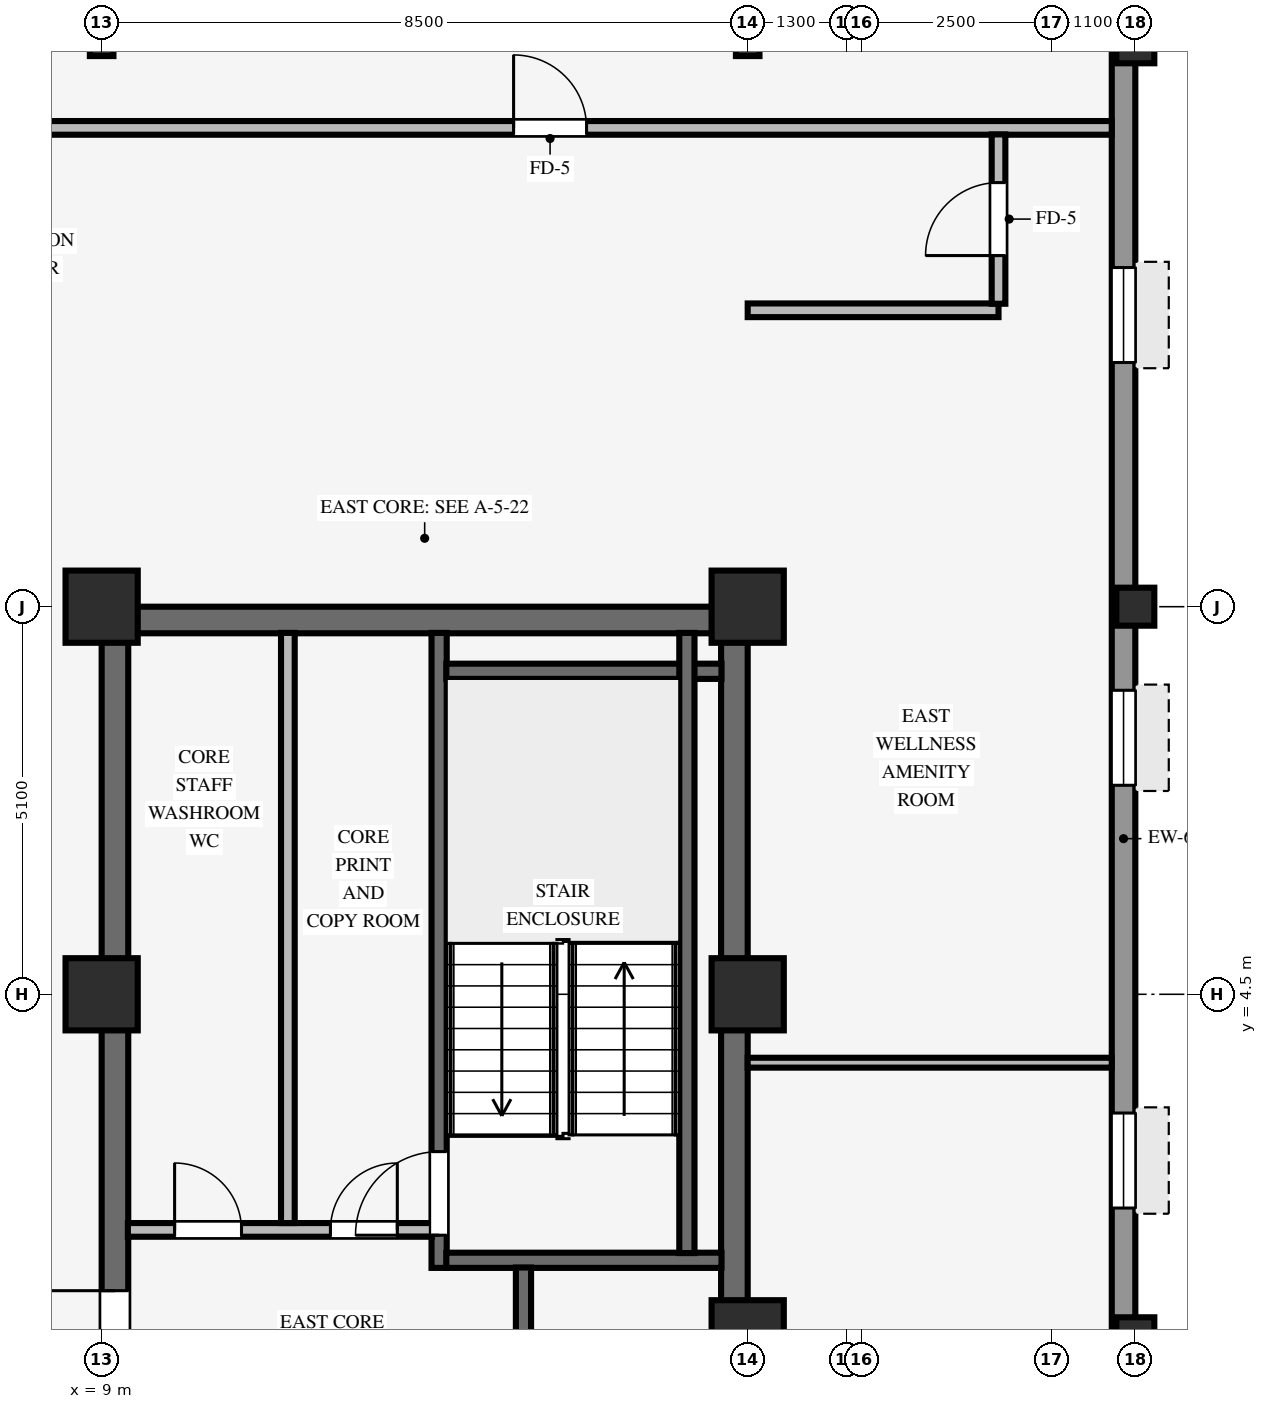
"""IFC4 building model, lengths in metres.
Left out: names, types, materials, properties, quantities, classifications, styles, units other than length and angle.
Written with IfcOpenShell. Run it as: python <this file> out.ifc"""

import sys

from ifc_helpers import new_model, si_unit, direction, frame, frame_2d, origin, origin_2d, place, context, subcontext, project, spatial, rectangle, hollow_rectangle, i_section, extrude, source, transform, mapped, element, fill, save


model = new_model("IFC4")
c1 = context("Model", 3, precision=1e-05, world=origin(), true_north=direction((0.0, 1.0)))
c2 = subcontext(c1, "Body", "Model", "MODEL_VIEW")
j1 = project(units=[si_unit("LENGTHUNIT", "METRE"), si_unit("PLANEANGLEUNIT", "RADIAN")], contexts=[c1])
p1 = place(None, origin())
s1 = spatial("IfcSite", under=j1, at=p1, CompositionType="ELEMENT")
p2 = place(p1, origin())
s2 = spatial("IfcBuilding", under=s1, at=p2, CompositionType="ELEMENT")
p3 = place(p2, frame((0.0, 0.0, 194.55)))
s3 = spatial("IfcBuildingStorey", under=s2, at=p3, CompositionType="ELEMENT", Elevation=194.55)
p4 = place(p3, frame((9.0, 9.425, 0.0), z_axis=(0.0, 0.0, 1.0), x_axis=(1.0, 0.0, 0.0)))
e1 = element("IfcWall", 1, at=p4, inside=s3, PredefinedType="SHEAR", context=c2, shape_type="SweptSolid", body=[
    extrude(rectangle(XDim=8.5, YDim=0.35, at=frame_2d((4.25, 0.0))), origin(), (0.0, 0.0, 1.0), 3.37),
])
p5 = place(p3, frame((9.175, -9.255, 0.0), z_axis=(0.0, 0.0, 1.0), x_axis=(0.0, 1.0, 0.0)))
e2 = element("IfcWall", 2, at=p5, inside=s3, PredefinedType="SHEAR", context=c2, shape_type="SweptSolid", body=[
    extrude(rectangle(XDim=18.51, YDim=0.35, at=frame_2d((9.255, 0.0))), origin(), (0.0, 0.0, 1.0), 3.37),
])
p6 = place(p5, frame((8.655, 0.0, 0.0)))
e3 = element("IfcOpeningElement", 3, at=p6, cuts=e2, PredefinedType="OPENING", context=c2, shape_type="SweptSolid", body=[
    extrude(rectangle(XDim=1.2, YDim=2.15, at=frame_2d((0.6, 1.075))), frame((0.0, 0.185, 0.0), z_axis=(0.0, -1.0, 0.0), x_axis=(1.0, 0.0, 0.0)), (0.0, 0.0, 1.0), 0.37),
])
p7 = place(p3, frame((17.325, -9.255, 0.0), z_axis=(0.0, 0.0, 1.0), x_axis=(0.0, 1.0, 0.0)))
e4 = element("IfcWall", 4, at=p7, inside=s3, PredefinedType="SHEAR", context=c2, shape_type="SweptSolid", body=[
    extrude(rectangle(XDim=18.51, YDim=0.35, at=frame_2d((9.255, 0.0))), origin(), (0.0, 0.0, 1.0), 3.37),
])
for number, where, z_axis, x_axis in (
    (5, (9.0, 4.5, 0.0), (0.0, 0.0, 1.0), (1.0, 0.0, 0.0)),
    (6, (9.0, 9.6, 0.0), (0.0, 0.0, 1.0), (1.0, 0.0, 0.0)),
    (7, (17.5, 4.5, 0.0), (0.0, 0.0, 1.0), (1.0, 0.0, 0.0)),
    (8, (17.5, 9.6, 0.0), (0.0, 0.0, 1.0), (1.0, 0.0, 0.0)),
    (9, (17.5, 0.0, 0.0), (0.0, 0.0, 1.0), (1.0, 0.0, 0.0)),
):
    element("IfcColumn", number, at=place(p3, frame(where, z_axis=z_axis, x_axis=x_axis)), inside=s3, PredefinedType="COLUMN", context=c2, shape_type="SweptSolid", body=[
        extrude(rectangle(XDim=0.95, YDim=0.95, at=origin_2d()), origin(), (0.0, 0.0, 1.0), 3.37),
    ])
for number, where, z_axis, x_axis in (
    (10, (22.6, 0.0, 0.0), (0.0, 0.0, 1.0), (1.0, 0.0, 0.0)),
    (11, (22.6, 9.6, 0.0), (0.0, 0.0, 1.0), (1.0, 0.0, 0.0)),
    (12, (22.6, 17.0, 0.0), (0.0, 0.0, 1.0), (1.0, 0.0, 0.0)),
):
    element("IfcColumn", number, at=place(p3, frame(where, z_axis=z_axis, x_axis=x_axis)), inside=s3, PredefinedType="COLUMN", context=c2, shape_type="SweptSolid", body=[
        extrude(hollow_rectangle(XDim=0.5, YDim=0.5, WallThickness=0.032, InnerFilletRadius=0.032, OuterFilletRadius=0.064, at=origin_2d()), origin(), (0.0, 0.0, 1.0), 3.37),
    ])
for number, where, z_axis, x_axis in (
    (13, (9.0, 17.0, 0.0), (0.0, 0.0, 1.0), (1.0, 0.0, 0.0)),
    (14, (17.5, 17.0, 0.0), (0.0, 0.0, 1.0), (1.0, 0.0, 0.0)),
):
    element("IfcColumn", number, at=place(p3, frame(where, z_axis=z_axis, x_axis=x_axis)), inside=s3, PredefinedType="COLUMN", context=c2, shape_type="SweptSolid", body=[
        extrude(i_section(OverallWidth=0.31, OverallDepth=0.31, WebThickness=0.015, FlangeThickness=0.015, FilletRadius=0.015, at=origin_2d()), origin(), (0.0, 0.0, 1.0), 3.37),
    ])
p8 = place(p3, frame((22.445, -20.794, 0.0), z_axis=(0.0, 0.0, 1.0), x_axis=(0.0, 1.0, 0.0)))
e15 = element("IfcWall", 15, at=p8, inside=s3, PredefinedType="STANDARD", context=c2, shape_type="SweptSolid", body=[
    extrude(rectangle(XDim=37.788, YDim=0.31, at=frame_2d((18.894, 0.0))), origin(), (0.0, 0.0, 1.0), 2.705),
])
p9 = place(p8, frame((16.474, 0.0, 0.0), z_axis=(0.0, 0.0, 1.0), x_axis=(-1.0, 0.0, 0.0)))
e16 = element("IfcOpeningElement", 16, at=p9, cuts=e15, PredefinedType="OPENING", context=c2, shape_type="SweptSolid", body=[
    extrude(rectangle(XDim=0.98, YDim=2.15, at=frame_2d((0.49, 1.075))), frame((0.0, 0.165, 0.0), z_axis=(0.0, -1.0, 0.0), x_axis=(1.0, 0.0, 0.0)), (0.0, 0.0, 1.0), 0.33),
])
p10 = place(p8, frame((1.581, 0.0, 0.8)))
e17 = element("IfcOpeningElement", 17, at=p10, cuts=e15, PredefinedType="OPENING", context=c2, shape_type="SweptSolid", body=[
    extrude(rectangle(XDim=1.25, YDim=1.52, at=frame_2d((0.625, 0.76))), frame((0.0, 0.165, 0.0), z_axis=(0.0, -1.0, 0.0), x_axis=(1.0, 0.0, 0.0)), (0.0, 0.0, 1.0), 0.33),
])
p11 = place(p8, frame((8.044, 0.0, 0.8)))
e18 = element("IfcOpeningElement", 18, at=p11, cuts=e15, PredefinedType="OPENING", context=c2, shape_type="SweptSolid", body=[
    extrude(rectangle(XDim=1.25, YDim=1.52, at=frame_2d((0.625, 0.76))), frame((0.0, 0.165, 0.0), z_axis=(0.0, -1.0, 0.0), x_axis=(1.0, 0.0, 0.0)), (0.0, 0.0, 1.0), 0.33),
])
p12 = place(p8, frame((13.156, 0.0, 0.8)))
e19 = element("IfcOpeningElement", 19, at=p12, cuts=e15, PredefinedType="OPENING", context=c2, shape_type="SweptSolid", body=[
    extrude(rectangle(XDim=1.25, YDim=1.52, at=frame_2d((0.625, 0.76))), frame((0.0, 0.165, 0.0), z_axis=(0.0, -1.0, 0.0), x_axis=(1.0, 0.0, 0.0)), (0.0, 0.0, 1.0), 0.33),
])
p13 = place(p8, frame((18.269, 0.0, 0.8)))
e20 = element("IfcOpeningElement", 20, at=p13, cuts=e15, PredefinedType="OPENING", context=c2, shape_type="SweptSolid", body=[
    extrude(rectangle(XDim=1.25, YDim=1.52, at=frame_2d((0.625, 0.76))), frame((0.0, 0.165, 0.0), z_axis=(0.0, -1.0, 0.0), x_axis=(1.0, 0.0, 0.0)), (0.0, 0.0, 1.0), 0.33),
])
p14 = place(p8, frame((22.482, 0.0, 0.8)))
e21 = element("IfcOpeningElement", 21, at=p14, cuts=e15, PredefinedType="OPENING", context=c2, shape_type="SweptSolid", body=[
    extrude(rectangle(XDim=1.25, YDim=1.52, at=frame_2d((0.625, 0.76))), frame((0.0, 0.165, 0.0), z_axis=(0.0, -1.0, 0.0), x_axis=(1.0, 0.0, 0.0)), (0.0, 0.0, 1.0), 0.33),
])
p15 = place(p8, frame((28.044, 0.0, 0.8)))
e22 = element("IfcOpeningElement", 22, at=p15, cuts=e15, PredefinedType="OPENING", context=c2, shape_type="SweptSolid", body=[
    extrude(rectangle(XDim=1.25, YDim=1.52, at=frame_2d((0.625, 0.76))), frame((0.0, 0.165, 0.0), z_axis=(0.0, -1.0, 0.0), x_axis=(1.0, 0.0, 0.0)), (0.0, 0.0, 1.0), 0.33),
])
p16 = place(p8, frame((33.607, 0.0, 0.8)))
e23 = element("IfcOpeningElement", 23, at=p16, cuts=e15, PredefinedType="OPENING", context=c2, shape_type="SweptSolid", body=[
    extrude(rectangle(XDim=1.25, YDim=1.52, at=frame_2d((0.625, 0.76))), frame((0.0, 0.165, 0.0), z_axis=(0.0, -1.0, 0.0), x_axis=(1.0, 0.0, 0.0)), (0.0, 0.0, 1.0), 0.33),
])
p17 = place(p3, frame((13.44, 0.9, 0.0), z_axis=(0.0, 0.0, 1.0), x_axis=(0.0, 1.0, 0.0)))
e24 = element("IfcWall", 24, at=p17, inside=s3, PredefinedType="SHEAR", context=c2, shape_type="SweptSolid", body=[
    extrude(rectangle(XDim=8.355, YDim=0.2, at=frame_2d((4.177, 0.0))), origin(), (0.0, 0.0, 1.0), 3.37),
])
p18 = place(p17, frame((0.43, 0.0, 0.0)))
e25 = element("IfcOpeningElement", 25, at=p18, cuts=e24, PredefinedType="OPENING", context=c2, shape_type="SweptSolid", body=[
    extrude(rectangle(XDim=1.1, YDim=2.15, at=frame_2d((0.55, 1.075))), frame((0.0, 0.11, 0.0), z_axis=(0.0, -1.0, 0.0), x_axis=(1.0, 0.0, 0.0)), (0.0, 0.0, 1.0), 0.22),
])
for number, where, z_axis, x_axis in (
    (26, (13.535, 1.0, 0.0), (0.0, 0.0, 1.0), (1.0, 0.0, 0.0)),
    (27, (13.535, 8.75, 0.0), (0.0, 0.0, 1.0), (1.0, 0.0, 0.0)),
):
    element("IfcWall", number, at=place(p3, frame(where, z_axis=z_axis, x_axis=x_axis)), inside=s3, PredefinedType="SHEAR", context=c2, shape_type="SweptSolid", body=[
        extrude(rectangle(XDim=3.62, YDim=0.2, at=frame_2d((1.81, 0.0))), origin(), (0.0, 0.0, 1.0), 3.37),
    ])
p19 = place(p3, frame((16.7, 1.095, 0.0), z_axis=(0.0, 0.0, 1.0), x_axis=(0.0, 1.0, 0.0)))
e28 = element("IfcWall", 28, at=p19, inside=s3, PredefinedType="SHEAR", context=c2, shape_type="SweptSolid", body=[
    extrude(rectangle(XDim=8.16, YDim=0.2, at=frame_2d((4.08, 0.0))), origin(), (0.0, 0.0, 1.0), 3.37),
])
p20 = place(p3, frame((14.55, -9.255, 0.0), z_axis=(0.0, 0.0, 1.0), x_axis=(0.0, 1.0, 0.0)))
e29 = element("IfcWall", 29, at=p20, inside=s3, PredefinedType="SHEAR", context=c2, shape_type="SweptSolid", body=[
    extrude(rectangle(XDim=10.16, YDim=0.2, at=frame_2d((5.08, 0.0))), origin(), (0.0, 0.0, 1.0), 3.37),
])
p21 = place(p20, frame((6.615, 0.0, 0.0)))
e30 = element("IfcOpeningElement", 30, at=p21, cuts=e29, PredefinedType="OPENING", context=c2, shape_type="SweptSolid", body=[
    extrude(rectangle(XDim=0.88, YDim=2.1, at=frame_2d((0.44, 1.05))), frame((0.0, 0.11, 0.0), z_axis=(0.0, -1.0, 0.0), x_axis=(1.0, 0.0, 0.0)), (0.0, 0.0, 1.0), 0.22),
])
p22 = place(p20, frame((0.98, 0.0, 0.0)))
e31 = element("IfcOpeningElement", 31, at=p22, cuts=e29, PredefinedType="OPENING", context=c2, shape_type="SweptSolid", body=[
    extrude(rectangle(XDim=1.15, YDim=2.15, at=frame_2d((0.575, 1.075))), frame((0.0, 0.11, 0.0), z_axis=(0.0, -1.0, 0.0), x_axis=(1.0, 0.0, 0.0)), (0.0, 0.0, 1.0), 0.22),
])
p23 = place(p3, frame((9.345, 1.4, 0.0), z_axis=(0.0, 0.0, 1.0), x_axis=(1.0, 0.0, 0.0)))
e32 = element("IfcWall", 32, at=p23, inside=s3, PredefinedType="PARTITIONING", context=c2, shape_type="SweptSolid", body=[
    extrude(rectangle(XDim=4.0, YDim=0.18, at=frame_2d((2.0, 0.0))), origin(), (0.0, 0.0, 1.0), 3.36),
])
p24 = place(p23, frame((0.615, 0.0, 0.0)))
e33 = element("IfcOpeningElement", 33, at=p24, cuts=e32, PredefinedType="OPENING", context=c2, shape_type="SweptSolid", body=[
    extrude(rectangle(XDim=0.88, YDim=2.1, at=frame_2d((0.44, 1.05))), frame((0.0, 0.1, 0.0), z_axis=(0.0, -1.0, 0.0), x_axis=(1.0, 0.0, 0.0)), (0.0, 0.0, 1.0), 0.2),
])
p25 = place(p23, frame((2.665, 0.0, 0.0)))
e34 = element("IfcOpeningElement", 34, at=p25, cuts=e32, PredefinedType="OPENING", context=c2, shape_type="SweptSolid", body=[
    extrude(rectangle(XDim=0.88, YDim=2.1, at=frame_2d((0.44, 1.05))), frame((0.0, 0.1, 0.0), z_axis=(0.0, -1.0, 0.0), x_axis=(1.0, 0.0, 0.0)), (0.0, 0.0, 1.0), 0.2),
])
p26 = place(p3, frame((11.45, 1.49, 0.0), z_axis=(0.0, 0.0, 1.0), x_axis=(0.0, 1.0, 0.0)))
e35 = element("IfcWall", 35, at=p26, inside=s3, PredefinedType="PARTITIONING", context=c2, shape_type="SweptSolid", body=[
    extrude(rectangle(XDim=7.765, YDim=0.18, at=frame_2d((3.882, 0.0))), origin(), (0.0, 0.0, 1.0), 3.36),
])
p27 = place(p3, frame((17.5, 3.6, 0.0), z_axis=(0.0, 0.0, 1.0), x_axis=(1.0, 0.0, 0.0)))
e36 = element("IfcWall", 36, at=p27, inside=s3, PredefinedType="PARTITIONING", context=c2, shape_type="SweptSolid", body=[
    extrude(rectangle(XDim=4.79, YDim=0.13, at=frame_2d((2.395, 0.0))), origin(), (0.0, 0.0, 1.0), 3.36),
])
p28 = place(p3, frame((17.5, 13.5, 0.0), z_axis=(0.0, 0.0, 1.0), x_axis=(1.0, 0.0, 0.0)))
e37 = element("IfcWall", 37, at=p28, inside=s3, PredefinedType="PARTITIONING", context=c2, shape_type="SweptSolid", body=[
    extrude(rectangle(XDim=3.3, YDim=0.18, at=frame_2d((1.65, 0.0))), origin(), (0.0, 0.0, 1.0), 3.008),
])
p29 = place(p3, frame((-26.09, 15.9, 0.0), z_axis=(0.0, 0.0, 1.0), x_axis=(1.0, 0.0, 0.0)))
e38 = element("IfcWall", 38, at=p29, inside=s3, PredefinedType="PARTITIONING", context=c2, shape_type="SweptSolid", body=[
    extrude(rectangle(XDim=48.38, YDim=0.18, at=frame_2d((24.19, 0.0))), origin(), (0.0, 0.0, 1.0), 3.36),
])
p30 = place(p29, frame((14.29, 0.0, 0.0)))
e39 = element("IfcOpeningElement", 39, at=p30, cuts=e38, PredefinedType="OPENING", context=c2, shape_type="SweptSolid", body=[
    extrude(rectangle(XDim=0.96, YDim=2.1, at=frame_2d((0.48, 1.05))), frame((0.0, 0.1, 0.0), z_axis=(0.0, -1.0, 0.0), x_axis=(1.0, 0.0, 0.0)), (0.0, 0.0, 1.0), 0.2),
])
p31 = place(p29, frame((40.51, 0.0, 0.0)))
e40 = element("IfcOpeningElement", 40, at=p31, cuts=e38, PredefinedType="OPENING", context=c2, shape_type="SweptSolid", body=[
    extrude(rectangle(XDim=0.96, YDim=2.1, at=frame_2d((0.48, 1.05))), frame((0.0, 0.1, 0.0), z_axis=(0.0, -1.0, 0.0), x_axis=(1.0, 0.0, 0.0)), (0.0, 0.0, 1.0), 0.2),
])
p32 = place(p3, frame((20.8, 13.586, 0.0), z_axis=(0.0, 0.0, 1.0), x_axis=(0.0, 1.0, 0.0)))
e41 = element("IfcWall", 41, at=p32, inside=s3, PredefinedType="PARTITIONING", context=c2, shape_type="SweptSolid", body=[
    extrude(rectangle(XDim=2.228, YDim=0.18, at=frame_2d((1.114, 0.0))), origin(), (0.0, 0.0, 1.0), 3.36),
])
p33 = place(p32, frame((0.634, 0.0, 0.0)))
e42 = element("IfcOpeningElement", 42, at=p33, cuts=e41, PredefinedType="OPENING", context=c2, shape_type="SweptSolid", body=[
    extrude(rectangle(XDim=0.96, YDim=2.1, at=frame_2d((0.48, 1.05))), frame((0.0, 0.1, 0.0), z_axis=(0.0, -1.0, 0.0), x_axis=(1.0, 0.0, 0.0)), (0.0, 0.0, 1.0), 0.2),
])
m1 = source(origin(), c2, "Body", "SweptSolid", [
    extrude(rectangle(XDim=1.25, YDim=1.52, at=frame_2d((0.625, 0.76))), frame((0.0, 0.03, 0.0), z_axis=(0.0, -1.0, 0.0), x_axis=(1.0, 0.0, 0.0)), (0.0, 0.0, 1.0), 0.06),
])
p34 = place(p14, origin())
e43 = element("IfcWindow", 43, at=p34, inside=s3, PartitioningType="SINGLE_PANEL", PredefinedType="WINDOW", context=c2, shape_type="MappedRepresentation", body=[
    mapped(m1, transform((0.0, 0.0, 0.0), scale=1.0)),
])
fill(e21, e43)
p35 = place(p15, origin())
e44 = element("IfcWindow", 44, at=p35, inside=s3, PartitioningType="SINGLE_PANEL", PredefinedType="WINDOW", context=c2, shape_type="MappedRepresentation", body=[
    mapped(m1, transform((0.0, 0.0, 0.0), scale=1.0)),
])
fill(e22, e44)
p36 = place(p16, origin())
e45 = element("IfcWindow", 45, at=p36, inside=s3, PartitioningType="SINGLE_PANEL", PredefinedType="WINDOW", context=c2, shape_type="MappedRepresentation", body=[
    mapped(m1, transform((0.0, 0.0, 0.0), scale=1.0)),
])
fill(e23, e45)
m2 = source(origin(), c2, "Body", "SweptSolid", [
    extrude(rectangle(XDim=1.1, YDim=2.15, at=frame_2d((0.55, 1.075))), frame((0.0, 0.025, 0.0), z_axis=(0.0, -1.0, 0.0), x_axis=(1.0, 0.0, 0.0)), (0.0, 0.0, 1.0), 0.05),
])
p37 = place(p18, origin())
e46 = element("IfcDoor", 46, at=p37, inside=s3, OperationType="SINGLE_SWING_LEFT", PredefinedType="DOOR", context=c2, shape_type="MappedRepresentation", body=[
    mapped(m2, transform((0.0, 0.0, 0.0), scale=1.0)),
])
fill(e25, e46)
m3 = source(origin(), c2, "Body", "SweptSolid", [
    extrude(rectangle(XDim=1.2, YDim=2.15, at=frame_2d((0.6, 1.075))), frame((0.0, 0.025, 0.0), z_axis=(0.0, -1.0, 0.0), x_axis=(1.0, 0.0, 0.0)), (0.0, 0.0, 1.0), 0.05),
])
p38 = place(p6, origin())
e47 = element("IfcDoor", 47, at=p38, inside=s3, OperationType="SINGLE_SWING_RIGHT", PredefinedType="DOOR", context=c2, shape_type="MappedRepresentation", body=[
    mapped(m3, transform((0.0, 0.0, 0.0), scale=1.0)),
])
fill(e3, e47)
m4 = source(origin(), c2, "Body", "SweptSolid", [
    extrude(rectangle(XDim=0.88, YDim=2.1, at=frame_2d((0.44, 1.05))), frame((0.0, 0.025, 0.0), z_axis=(0.0, -1.0, 0.0), x_axis=(1.0, 0.0, 0.0)), (0.0, 0.0, 1.0), 0.05),
])
p39 = place(p24, origin())
e48 = element("IfcDoor", 48, at=p39, inside=s3, OperationType="SINGLE_SWING_LEFT", PredefinedType="DOOR", context=c2, shape_type="MappedRepresentation", body=[
    mapped(m4, transform((0.0, 0.0, 0.0), scale=1.0)),
])
fill(e33, e48)
p40 = place(p25, origin())
e49 = element("IfcDoor", 49, at=p40, inside=s3, OperationType="SINGLE_SWING_RIGHT", PredefinedType="DOOR", context=c2, shape_type="MappedRepresentation", body=[
    mapped(m4, transform((0.0, 0.0, 0.0), scale=1.0)),
])
fill(e34, e49)
m5 = source(origin(), c2, "Body", "SweptSolid", [
    extrude(rectangle(XDim=0.96, YDim=2.1, at=frame_2d((0.48, 1.05))), frame((0.0, 0.025, 0.0), z_axis=(0.0, -1.0, 0.0), x_axis=(1.0, 0.0, 0.0)), (0.0, 0.0, 1.0), 0.05),
])
p41 = place(p31, origin())
e50 = element("IfcDoor", 50, at=p41, inside=s3, OperationType="SINGLE_SWING_LEFT", PredefinedType="DOOR", context=c2, shape_type="MappedRepresentation", body=[
    mapped(m5, transform((0.0, 0.0, 0.0), scale=1.0)),
])
fill(e40, e50)
p42 = place(p33, origin())
e51 = element("IfcDoor", 51, at=p42, inside=s3, OperationType="SINGLE_SWING_LEFT", PredefinedType="DOOR", context=c2, shape_type="MappedRepresentation", body=[
    mapped(m5, transform((0.0, 0.0, 0.0), scale=1.0)),
])
fill(e42, e51)
save(model, sys.argv[1])
